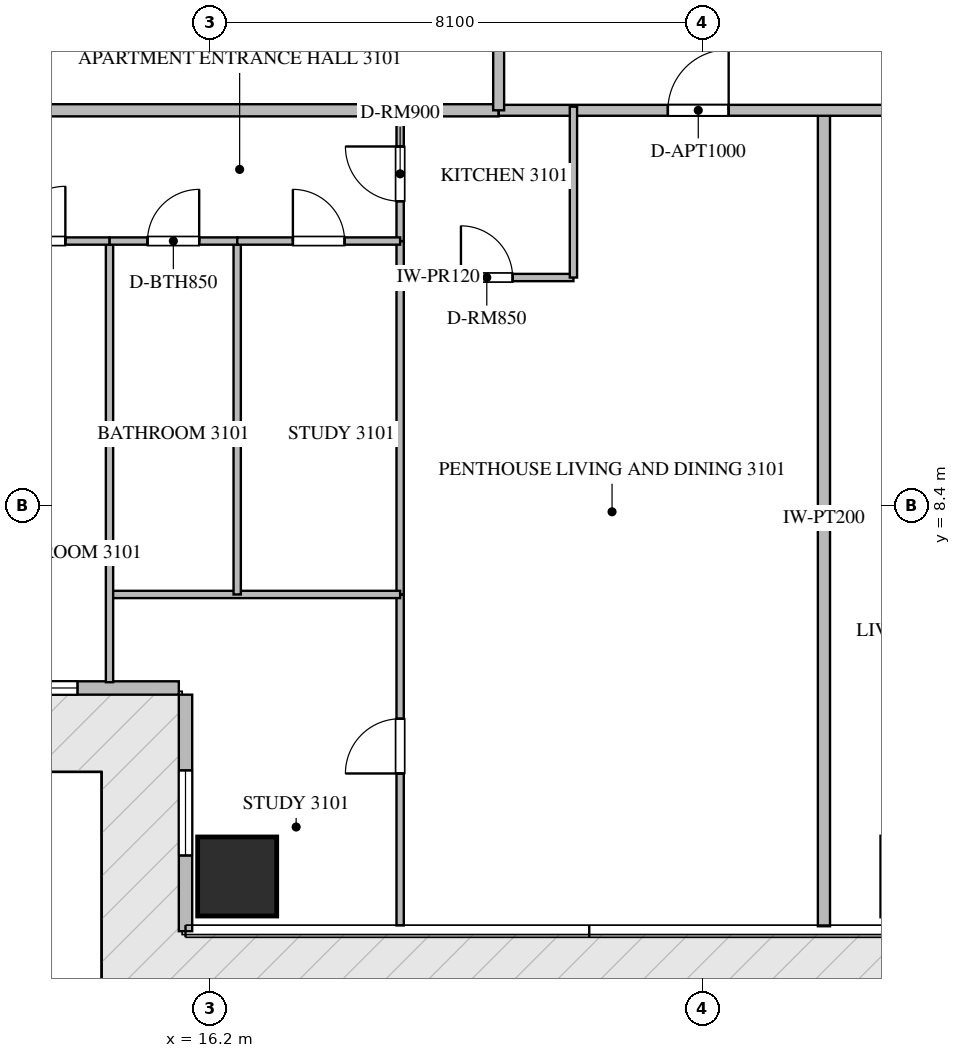
"""IFC4 building model, lengths in metres.
Left out: names, types, materials, properties, quantities, classifications, styles, units other than length and angle.
Written with IfcOpenShell. Run it as: python <this file> out.ifc"""

import sys

from ifc_helpers import new_model, si_unit, direction, frame, frame_2d, origin, origin_2d, place, context, subcontext, project, spatial, rectangle, extrude, source, transform, mapped, element, fill, save


model = new_model("IFC4")
c1 = context("Model", 3, precision=1e-05, world=origin(), true_north=direction((0.0, 1.0)))
c2 = subcontext(c1, "Body", "Model", "MODEL_VIEW")
j1 = project(units=[si_unit("LENGTHUNIT", "METRE"), si_unit("PLANEANGLEUNIT", "RADIAN")], contexts=[c1])
p1 = place(None, origin())
s1 = spatial("IfcSite", under=j1, at=p1, CompositionType="ELEMENT")
p2 = place(p1, origin())
s2 = spatial("IfcBuilding", under=s1, at=p2, CompositionType="ELEMENT")
p3 = place(p2, frame((0.0, 0.0, 127.65)))
s3 = spatial("IfcBuildingStorey", under=s2, at=p3, CompositionType="ELEMENT", Elevation=127.65)
m1 = source(origin(), c2, "Body", "SweptSolid", [
    extrude(rectangle(XDim=1.3, YDim=1.3, at=origin_2d()), origin(), (0.0, 0.0, 1.0), 3.75),
])
p4 = place(p3, frame((16.65, 2.3, -0.26), z_axis=(0.0, 0.0, 1.0), x_axis=(1.0, 0.0, 0.0)))
e1 = element("IfcColumn", 1, at=p4, inside=s3, PredefinedType="COLUMN", context=c2, shape_type="MappedRepresentation", body=[
    mapped(m1, transform((0.0, 0.0, 0.0), scale=1.0)),
])
p5 = place(p3, frame((11.91, 5.4, 0.0), z_axis=(0.0, 0.0, 1.0), x_axis=(1.0, 0.0, 0.0)))
e2 = element("IfcWall", 2, at=p5, inside=s3, PredefinedType="ELEMENTEDWALL", context=c2, shape_type="SweptSolid", body=[
    extrude(rectangle(XDim=3.78, YDim=0.22, at=frame_2d((1.89, 0.0))), origin(), (0.0, 0.0, 1.0), 3.475),
])
p6 = place(p5, frame((0.714, 0.0, 0.65)))
e3 = element("IfcOpeningElement", 3, at=p6, cuts=e2, PredefinedType="OPENING", context=c2, shape_type="SweptSolid", body=[
    extrude(rectangle(XDim=1.4, YDim=2.05, at=frame_2d((0.7, 1.025))), frame((0.0, 0.12, 0.0), z_axis=(0.0, -1.0, 0.0), x_axis=(1.0, 0.0, 0.0)), (0.0, 0.0, 1.0), 0.24),
])
p7 = place(p3, frame((15.8, 5.29, 0.0), z_axis=(0.0, 0.0, 1.0), x_axis=(0.0, -1.0, 0.0)))
e4 = element("IfcWall", 4, at=p7, inside=s3, PredefinedType="ELEMENTEDWALL", context=c2, shape_type="SweptSolid", body=[
    extrude(rectangle(XDim=3.89, YDim=0.22, at=frame_2d((1.945, 0.0))), origin(), (0.0, 0.0, 1.0), 3.475),
])
p8 = place(p7, frame((1.245, 0.0, 0.65)))
e5 = element("IfcOpeningElement", 5, at=p8, cuts=e4, PredefinedType="OPENING", context=c2, shape_type="SweptSolid", body=[
    extrude(rectangle(XDim=1.4, YDim=2.05, at=frame_2d((0.7, 1.025))), frame((0.0, 0.12, 0.0), z_axis=(0.0, -1.0, 0.0), x_axis=(1.0, 0.0, 0.0)), (0.0, 0.0, 1.0), 0.24),
])
p9 = place(p3, frame((26.3, 1.482, 0.0), z_axis=(0.0, 0.0, 1.0), x_axis=(0.0, 1.0, 0.0)))
e6 = element("IfcWall", 6, at=p9, inside=s3, PredefinedType="PARTITIONING", context=c2, shape_type="SweptSolid", body=[
    extrude(rectangle(XDim=13.418, YDim=0.2, at=frame_2d((6.709, 0.0))), origin(), (0.0, 0.0, 1.0), 3.49),
])
p10 = place(p3, frame((7.882, 14.9, 0.0), z_axis=(0.0, 0.0, 1.0), x_axis=(1.0, 0.0, 0.0)))
e7 = element("IfcWall", 7, at=p10, inside=s3, PredefinedType="PARTITIONING", context=c2, shape_type="SweptSolid", body=[
    extrude(rectangle(XDim=13.068, YDim=0.2, at=frame_2d((6.534, 0.0))), origin(), (0.0, 0.0, 1.0), 3.49),
])
p11 = place(p3, frame((20.952, 14.9, 0.0), z_axis=(0.0, 0.0, 1.0), x_axis=(1.0, 0.0, 0.0)))
e8 = element("IfcWall", 8, at=p11, inside=s3, PredefinedType="PARTITIONING", context=c2, shape_type="SweptSolid", body=[
    extrude(rectangle(XDim=22.896, YDim=0.18, at=frame_2d((11.448, 0.0))), origin(), (0.0, 0.0, 1.0), 3.49),
])
p12 = place(p11, frame((2.781, 0.0, 0.0)))
e9 = element("IfcOpeningElement", 9, at=p12, cuts=e8, PredefinedType="OPENING", context=c2, shape_type="SweptSolid", body=[
    extrude(rectangle(XDim=1.0, YDim=2.15, at=frame_2d((0.5, 1.075))), frame((0.0, 0.1, 0.0), z_axis=(0.0, -1.0, 0.0), x_axis=(1.0, 0.0, 0.0)), (0.0, 0.0, 1.0), 0.2),
])
p13 = place(p11, frame((7.16, 0.0, 0.0)))
e10 = element("IfcOpeningElement", 10, at=p13, cuts=e8, PredefinedType="OPENING", context=c2, shape_type="SweptSolid", body=[
    extrude(rectangle(XDim=1.0, YDim=2.15, at=frame_2d((0.5, 1.075))), frame((0.0, 0.1, 0.0), z_axis=(0.0, -1.0, 0.0), x_axis=(1.0, 0.0, 0.0)), (0.0, 0.0, 1.0), 0.2),
])
p14 = place(p11, frame((19.115, 0.0, 0.0)))
e11 = element("IfcOpeningElement", 11, at=p14, cuts=e8, PredefinedType="OPENING", context=c2, shape_type="SweptSolid", body=[
    extrude(rectangle(XDim=1.0, YDim=2.15, at=frame_2d((0.5, 1.075))), frame((0.0, 0.1, 0.0), z_axis=(0.0, -1.0, 0.0), x_axis=(1.0, 0.0, 0.0)), (0.0, 0.0, 1.0), 0.2),
])
p15 = place(p3, frame((20.95, 14.9, 0.0), z_axis=(0.0, 0.0, 1.0), x_axis=(0.0, 1.0, 0.0)))
e12 = element("IfcWall", 12, at=p15, inside=s3, PredefinedType="PARTITIONING", context=c2, shape_type="SweptSolid", body=[
    extrude(rectangle(XDim=18.7, YDim=0.18, at=frame_2d((9.35, 0.0))), origin(), (0.0, 0.0, 1.0), 3.49),
])
p16 = place(p15, frame((1.805, 0.0, 0.0)))
e13 = element("IfcOpeningElement", 13, at=p16, cuts=e12, PredefinedType="OPENING", context=c2, shape_type="SweptSolid", body=[
    extrude(rectangle(XDim=1.0, YDim=2.15, at=frame_2d((0.5, 1.075))), frame((0.0, 0.1, 0.0), z_axis=(0.0, -1.0, 0.0), x_axis=(1.0, 0.0, 0.0)), (0.0, 0.0, 1.0), 0.2),
])
p17 = place(p15, frame((10.602, 0.0, 0.0)))
e14 = element("IfcOpeningElement", 14, at=p17, cuts=e12, PredefinedType="OPENING", context=c2, shape_type="SweptSolid", body=[
    extrude(rectangle(XDim=1.0, YDim=2.15, at=frame_2d((0.5, 1.075))), frame((0.0, 0.1, 0.0), z_axis=(0.0, -1.0, 0.0), x_axis=(1.0, 0.0, 0.0)), (0.0, 0.0, 1.0), 0.2),
])
p18 = place(p3, frame((19.33, 12.15, 0.0), z_axis=(0.0, 0.0, 1.0), x_axis=(1.0, 0.0, 0.0)))
e15 = element("IfcWall", 15, at=p18, inside=s3, PredefinedType="PARTITIONING", context=c2, shape_type="SweptSolid", body=[
    extrude(rectangle(XDim=2.85, YDim=0.12, at=frame_2d((1.425, 0.0))), origin(), (0.0, 0.0, 1.0), 3.49),
])
p19 = place(p18, frame((1.0, 0.0, 0.0)))
e16 = element("IfcOpeningElement", 16, at=p19, cuts=e15, PredefinedType="OPENING", context=c2, shape_type="SweptSolid", body=[
    extrude(rectangle(XDim=0.85, YDim=2.1, at=frame_2d((0.425, 1.05))), frame((0.0, 0.07, 0.0), z_axis=(0.0, -1.0, 0.0), x_axis=(1.0, 0.0, 0.0)), (0.0, 0.0, 1.0), 0.14),
])
p20 = place(p3, frame((22.18, 12.15, 0.0), z_axis=(0.0, 0.0, 1.0), x_axis=(0.0, 1.0, 0.0)))
e17 = element("IfcWall", 17, at=p20, inside=s3, PredefinedType="PARTITIONING", context=c2, shape_type="SweptSolid", body=[
    extrude(rectangle(XDim=2.81, YDim=0.12, at=frame_2d((1.405, 0.0))), origin(), (0.0, 0.0, 1.0), 3.49),
])
p21 = place(p3, frame((19.33, 12.75, 0.0), z_axis=(0.0, 0.0, 1.0), x_axis=(0.0, 1.0, 0.0)))
e18 = element("IfcWall", 18, at=p21, inside=s3, PredefinedType="PARTITIONING", context=c2, shape_type="SweptSolid", body=[
    extrude(rectangle(XDim=2.21, YDim=0.12, at=frame_2d((1.105, 0.0))), origin(), (0.0, 0.0, 1.0), 3.49),
])
p22 = place(p21, frame((0.655, 0.0, 0.0)))
e19 = element("IfcOpeningElement", 19, at=p22, cuts=e18, PredefinedType="OPENING", context=c2, shape_type="SweptSolid", body=[
    extrude(rectangle(XDim=0.9, YDim=2.1, at=frame_2d((0.45, 1.05))), frame((0.0, 0.07, 0.0), z_axis=(0.0, -1.0, 0.0), x_axis=(1.0, 0.0, 0.0)), (0.0, 0.0, 1.0), 0.14),
])
p23 = place(p3, frame((19.33, 1.495, 0.0), z_axis=(0.0, 0.0, 1.0), x_axis=(0.0, 1.0, 0.0)))
e20 = element("IfcWall", 20, at=p23, inside=s3, PredefinedType="PARTITIONING", context=c2, shape_type="SweptSolid", body=[
    extrude(rectangle(XDim=5.443, YDim=0.12, at=frame_2d((2.721, 0.0))), origin(), (0.0, 0.0, 1.0), 3.49),
])
p24 = place(p23, frame((2.499, 0.0, 0.0)))
e21 = element("IfcOpeningElement", 21, at=p24, cuts=e20, PredefinedType="OPENING", context=c2, shape_type="SweptSolid", body=[
    extrude(rectangle(XDim=0.9, YDim=2.1, at=frame_2d((0.45, 1.05))), frame((0.0, 0.07, 0.0), z_axis=(0.0, -1.0, 0.0), x_axis=(1.0, 0.0, 0.0)), (0.0, 0.0, 1.0), 0.14),
])
p25 = place(p3, frame((19.33, 6.94, 0.0), z_axis=(0.0, 0.0, 1.0), x_axis=(0.0, 1.0, 0.0)))
e22 = element("IfcWall", 22, at=p25, inside=s3, PredefinedType="PARTITIONING", context=c2, shape_type="SweptSolid", body=[
    extrude(rectangle(XDim=5.808, YDim=0.12, at=frame_2d((2.904, 0.0))), origin(), (0.0, 0.0, 1.0), 3.49),
])
p26 = place(p3, frame((14.55, 6.938, 0.0), z_axis=(0.0, 0.0, 1.0), x_axis=(1.0, 0.0, 0.0)))
e23 = element("IfcWall", 23, at=p26, inside=s3, PredefinedType="PARTITIONING", context=c2, shape_type="SweptSolid", body=[
    extrude(rectangle(XDim=4.78, YDim=0.12, at=frame_2d((2.39, 0.0))), origin(), (0.0, 0.0, 1.0), 3.49),
])
p27 = place(p3, frame((14.55, 5.495, 0.0), z_axis=(0.0, 0.0, 1.0), x_axis=(0.0, 1.0, 0.0)))
e24 = element("IfcWall", 24, at=p27, inside=s3, PredefinedType="PARTITIONING", context=c2, shape_type="SweptSolid", body=[
    extrude(rectangle(XDim=7.255, YDim=0.12, at=frame_2d((3.627, 0.0))), origin(), (0.0, 0.0, 1.0), 3.49),
])
p28 = place(p3, frame((16.65, 6.938, 0.0), z_axis=(0.0, 0.0, 1.0), x_axis=(0.0, 1.0, 0.0)))
e25 = element("IfcWall", 25, at=p28, inside=s3, PredefinedType="PARTITIONING", context=c2, shape_type="SweptSolid", body=[
    extrude(rectangle(XDim=5.812, YDim=0.12, at=frame_2d((2.906, 0.0))), origin(), (0.0, 0.0, 1.0), 2.972),
])
p29 = place(p3, frame((14.55, 12.75, 0.0), z_axis=(0.0, 0.0, 1.0), x_axis=(1.0, 0.0, 0.0)))
e26 = element("IfcWall", 26, at=p29, inside=s3, PredefinedType="PARTITIONING", context=c2, shape_type="SweptSolid", body=[
    extrude(rectangle(XDim=2.1, YDim=0.12, at=frame_2d((1.05, 0.0))), origin(), (0.0, 0.0, 1.0), 3.49),
])
p30 = place(p29, frame((0.625, 0.0, 0.0)))
e27 = element("IfcOpeningElement", 27, at=p30, cuts=e26, PredefinedType="OPENING", context=c2, shape_type="SweptSolid", body=[
    extrude(rectangle(XDim=0.85, YDim=2.1, at=frame_2d((0.425, 1.05))), frame((0.0, 0.07, 0.0), z_axis=(0.0, -1.0, 0.0), x_axis=(1.0, 0.0, 0.0)), (0.0, 0.0, 1.0), 0.14),
])
p31 = place(p3, frame((16.652, 12.75, 0.0), z_axis=(0.0, 0.0, 1.0), x_axis=(1.0, 0.0, 0.0)))
e28 = element("IfcWall", 28, at=p31, inside=s3, PredefinedType="PARTITIONING", context=c2, shape_type="SweptSolid", body=[
    extrude(rectangle(XDim=2.678, YDim=0.12, at=frame_2d((1.339, 0.0))), origin(), (0.0, 0.0, 1.0), 3.49),
])
p32 = place(p31, frame((0.914, 0.0, 0.0)))
e29 = element("IfcOpeningElement", 29, at=p32, cuts=e28, PredefinedType="OPENING", context=c2, shape_type="SweptSolid", body=[
    extrude(rectangle(XDim=0.85, YDim=2.1, at=frame_2d((0.425, 1.05))), frame((0.0, 0.07, 0.0), z_axis=(0.0, -1.0, 0.0), x_axis=(1.0, 0.0, 0.0)), (0.0, 0.0, 1.0), 0.14),
])
p33 = place(p3, frame((12.2, 12.75, 0.0), z_axis=(0.0, 0.0, 1.0), x_axis=(1.0, 0.0, 0.0)))
e30 = element("IfcWall", 30, at=p33, inside=s3, PredefinedType="PARTITIONING", context=c2, shape_type="SweptSolid", body=[
    extrude(rectangle(XDim=2.348, YDim=0.12, at=frame_2d((1.174, 0.0))), origin(), (0.0, 0.0, 1.0), 3.49),
])
p34 = place(p33, frame((0.724, 0.0, 0.0)))
e31 = element("IfcOpeningElement", 31, at=p34, cuts=e30, PredefinedType="OPENING", context=c2, shape_type="SweptSolid", body=[
    extrude(rectangle(XDim=0.9, YDim=2.1, at=frame_2d((0.45, 1.05))), frame((0.0, 0.07, 0.0), z_axis=(0.0, -1.0, 0.0), x_axis=(1.0, 0.0, 0.0)), (0.0, 0.0, 1.0), 0.14),
])
m2 = source(origin(), c2, "Body", "SweptSolid", [
    extrude(rectangle(XDim=1.4, YDim=2.05, at=frame_2d((0.7, 1.025))), frame((0.0, 0.03, 0.0), z_axis=(0.0, -1.0, 0.0), x_axis=(1.0, 0.0, 0.0)), (0.0, 0.0, 1.0), 0.06),
])
p35 = place(p6, origin())
e32 = element("IfcWindow", 32, at=p35, inside=s3, PartitioningType="SINGLE_PANEL", PredefinedType="WINDOW", context=c2, shape_type="MappedRepresentation", body=[
    mapped(m2, transform((0.0, 0.0, 0.0), scale=1.0)),
])
fill(e3, e32)
p36 = place(p8, origin())
e33 = element("IfcWindow", 33, at=p36, inside=s3, PartitioningType="SINGLE_PANEL", PredefinedType="WINDOW", context=c2, shape_type="MappedRepresentation", body=[
    mapped(m2, transform((0.0, 0.0, 0.0), scale=1.0)),
])
fill(e5, e33)
m3 = source(origin(), c2, "Body", "SweptSolid", [
    extrude(rectangle(XDim=1.0, YDim=2.15, at=frame_2d((0.5, 1.075))), frame((0.0, 0.025, 0.0), z_axis=(0.0, -1.0, 0.0), x_axis=(1.0, 0.0, 0.0)), (0.0, 0.0, 1.0), 0.05),
])
p37 = place(p12, origin())
e34 = element("IfcDoor", 34, at=p37, inside=s3, OperationType="SINGLE_SWING_RIGHT", PredefinedType="DOOR", context=c2, shape_type="MappedRepresentation", body=[
    mapped(m3, transform((0.0, 0.0, 0.0), scale=1.0)),
])
fill(e9, e34)
m4 = source(origin(), c2, "Body", "SweptSolid", [
    extrude(rectangle(XDim=0.85, YDim=2.1, at=frame_2d((0.425, 1.05))), frame((0.0, 0.025, 0.0), z_axis=(0.0, -1.0, 0.0), x_axis=(1.0, 0.0, 0.0)), (0.0, 0.0, 1.0), 0.05),
])
p38 = place(p19, origin())
e35 = element("IfcDoor", 35, at=p38, inside=s3, OperationType="SINGLE_SWING_LEFT", PredefinedType="DOOR", context=c2, shape_type="MappedRepresentation", body=[
    mapped(m4, transform((0.0, 0.0, 0.0), scale=1.0)),
])
fill(e16, e35)
m5 = source(origin(), c2, "Body", "SweptSolid", [
    extrude(rectangle(XDim=0.9, YDim=2.1, at=frame_2d((0.45, 1.05))), frame((0.0, 0.025, 0.0), z_axis=(0.0, -1.0, 0.0), x_axis=(1.0, 0.0, 0.0)), (0.0, 0.0, 1.0), 0.05),
])
p39 = place(p22, origin())
e36 = element("IfcDoor", 36, at=p39, inside=s3, OperationType="SINGLE_SWING_RIGHT", PredefinedType="DOOR", context=c2, shape_type="MappedRepresentation", body=[
    mapped(m5, transform((0.0, 0.0, 0.0), scale=1.0)),
])
fill(e19, e36)
p40 = place(p24, origin())
e37 = element("IfcDoor", 37, at=p40, inside=s3, OperationType="SINGLE_SWING_LEFT", PredefinedType="DOOR", context=c2, shape_type="MappedRepresentation", body=[
    mapped(m5, transform((0.0, 0.0, 0.0), scale=1.0)),
])
fill(e21, e37)
p41 = place(p30, origin())
e38 = element("IfcDoor", 38, at=p41, inside=s3, OperationType="SINGLE_SWING_RIGHT", PredefinedType="DOOR", context=c2, shape_type="MappedRepresentation", body=[
    mapped(m4, transform((0.0, 0.0, 0.0), scale=1.0)),
])
fill(e27, e38)
p42 = place(p32, origin())
e39 = element("IfcDoor", 39, at=p42, inside=s3, OperationType="SINGLE_SWING_LEFT", PredefinedType="DOOR", context=c2, shape_type="MappedRepresentation", body=[
    mapped(m4, transform((0.0, 0.0, 0.0), scale=1.0)),
])
fill(e29, e39)
p43 = place(p34, origin())
e40 = element("IfcDoor", 40, at=p43, inside=s3, OperationType="SINGLE_SWING_RIGHT", PredefinedType="DOOR", context=c2, shape_type="MappedRepresentation", body=[
    mapped(m5, transform((0.0, 0.0, 0.0), scale=1.0)),
])
fill(e31, e40)
save(model, sys.argv[1])
